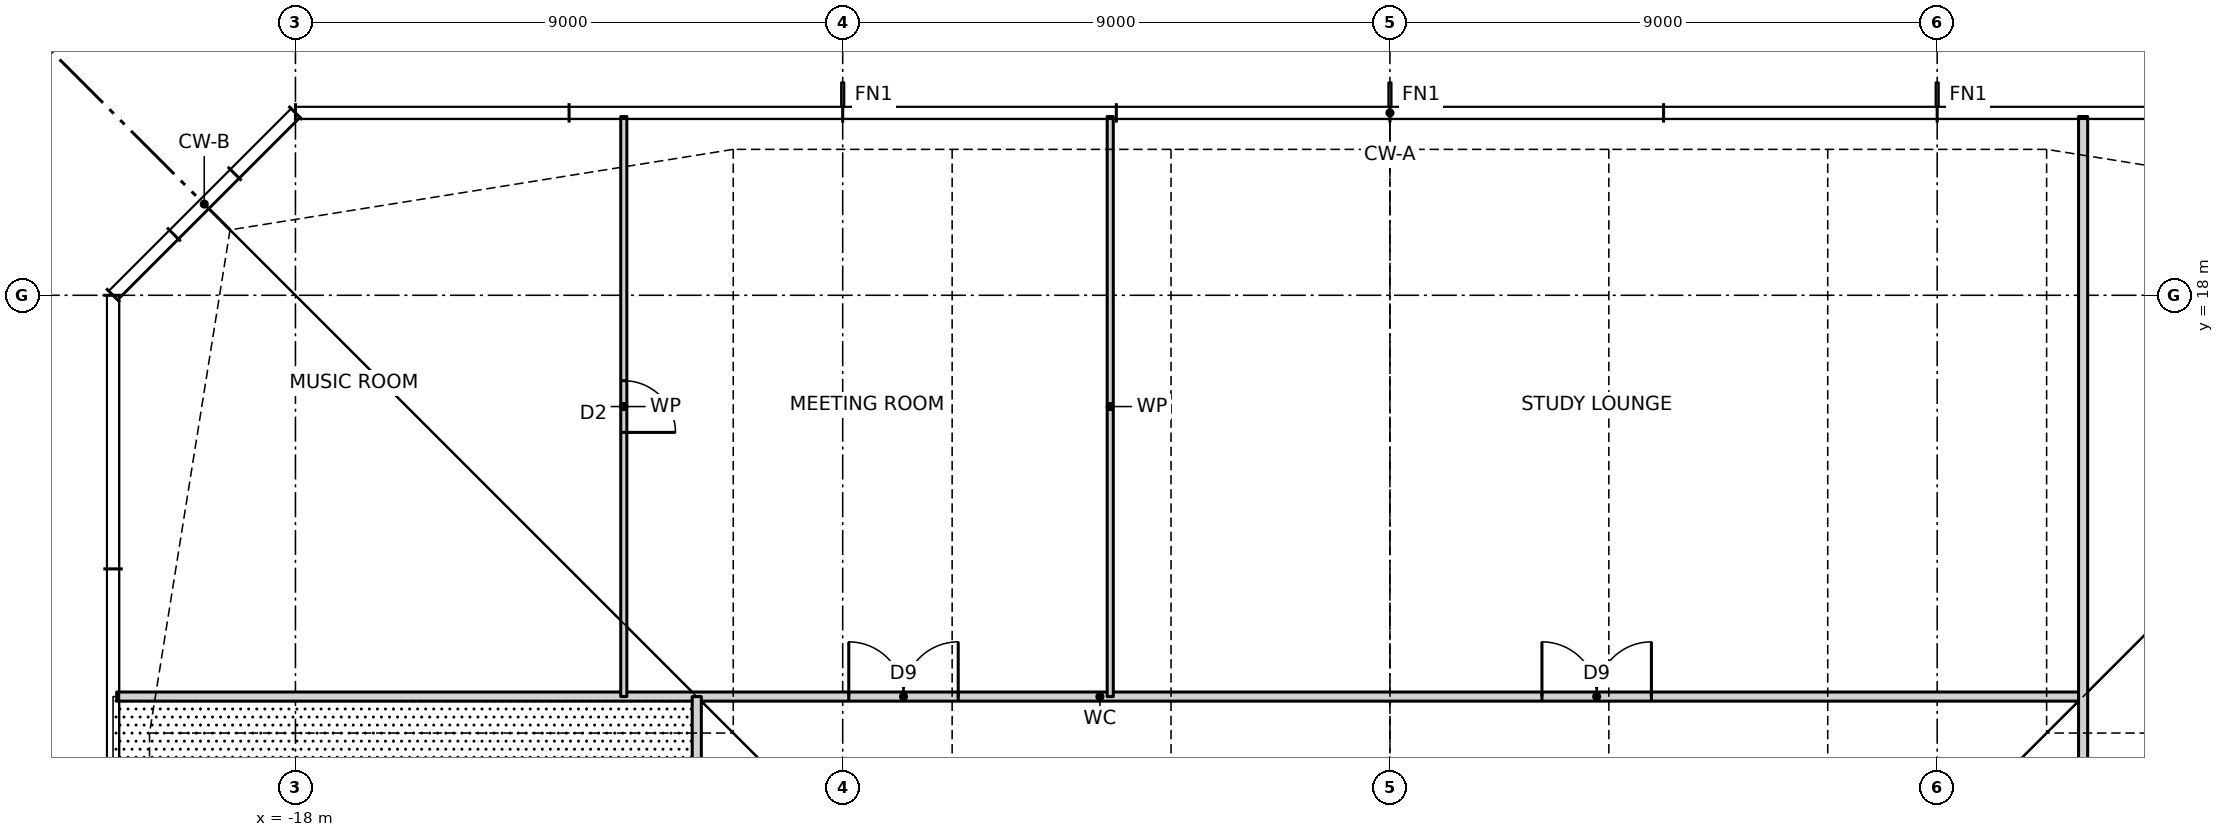
"""IFC4 building model, lengths in metres.
Left out: names, types, materials, properties, quantities, classifications, styles, units other than length and angle.
Written with IfcOpenShell. Run it as: python <this file> out.ifc"""

import sys

from ifc_helpers import new_model, si_unit, direction, frame, frame_2d, origin, place, context, subcontext, project, spatial, rectangle, extrude, element, fill, save


model = new_model("IFC4")
c1 = context("Model", 3, precision=1e-05, world=origin(), true_north=direction((0.0, 1.0)))
c2 = subcontext(c1, "Body", "Model", "MODEL_VIEW")
j1 = project(units=[si_unit("LENGTHUNIT", "METRE"), si_unit("PLANEANGLEUNIT", "RADIAN")], contexts=[c1])
p1 = place(None, origin())
s1 = spatial("IfcSite", under=j1, at=p1, CompositionType="ELEMENT")
p2 = place(p1, origin())
s2 = spatial("IfcBuilding", under=s1, at=p2, CompositionType="ELEMENT")
p3 = place(p2, frame((0.0, 0.0, 80.5)))
s3 = spatial("IfcBuildingStorey", under=s2, at=p3, CompositionType="ELEMENT", Elevation=80.5)
p4 = place(p3, frame((-20.94, 11.4, 0.0), z_axis=(0.0, 0.0, 1.0), x_axis=(1.0, 0.0, 0.0)))
e1 = element("IfcWall", 1, at=p4, inside=s3, PredefinedType="PARTITIONING", context=c2, shape_type="SweptSolid", body=[
    extrude(rectangle(XDim=32.34, YDim=0.15, at=frame_2d((16.17, 0.0))), origin(), (0.0, 0.0, 1.0), 3.27),
])
p5 = place(p4, frame((23.44, 0.0, 0.0)))
e2 = element("IfcOpeningElement", 2, at=p5, cuts=e1, PredefinedType="OPENING", context=c2, shape_type="SweptSolid", body=[
    extrude(rectangle(XDim=1.8, YDim=2.1, at=frame_2d((0.9, 1.05))), frame((0.0, 0.085, 0.0), z_axis=(0.0, -1.0, 0.0), x_axis=(1.0, 0.0, 0.0)), (0.0, 0.0, 1.0), 0.17),
])
p6 = place(p4, frame((12.04, 0.0, 0.0)))
e3 = element("IfcOpeningElement", 3, at=p6, cuts=e1, PredefinedType="OPENING", context=c2, shape_type="SweptSolid", body=[
    extrude(rectangle(XDim=1.8, YDim=2.1, at=frame_2d((0.9, 1.05))), frame((0.0, 0.085, 0.0), z_axis=(0.0, -1.0, 0.0), x_axis=(1.0, 0.0, 0.0)), (0.0, 0.0, 1.0), 0.17),
])
p7 = place(p3, frame((11.4, -11.4, 0.0), z_axis=(0.0, 0.0, 1.0), x_axis=(0.0, 1.0, 0.0)))
e4 = element("IfcWall", 4, at=p7, inside=s3, PredefinedType="PARTITIONING", context=c2, shape_type="SweptSolid", body=[
    extrude(rectangle(XDim=32.34, YDim=0.15, at=frame_2d((16.17, 0.0))), origin(), (0.0, 0.0, 1.0), 3.27),
])
p8 = place(p7, frame((1.65, 0.0, 0.0)))
e5 = element("IfcOpeningElement", 5, at=p8, cuts=e4, PredefinedType="OPENING", context=c2, shape_type="SweptSolid", body=[
    extrude(rectangle(XDim=0.9, YDim=2.1, at=frame_2d((0.45, 1.05))), frame((0.0, 0.085, 0.0), z_axis=(0.0, -1.0, 0.0), x_axis=(1.0, 0.0, 0.0)), (0.0, 0.0, 1.0), 0.17),
])
p9 = place(p7, frame((5.55, 0.0, 0.0)))
e6 = element("IfcOpeningElement", 6, at=p9, cuts=e4, PredefinedType="OPENING", context=c2, shape_type="SweptSolid", body=[
    extrude(rectangle(XDim=0.9, YDim=2.1, at=frame_2d((0.45, 1.05))), frame((0.0, 0.085, 0.0), z_axis=(0.0, -1.0, 0.0), x_axis=(1.0, 0.0, 0.0)), (0.0, 0.0, 1.0), 0.17),
])
p10 = place(p7, frame((8.55, 0.0, 0.0)))
e7 = element("IfcOpeningElement", 7, at=p10, cuts=e4, PredefinedType="OPENING", context=c2, shape_type="SweptSolid", body=[
    extrude(rectangle(XDim=0.9, YDim=2.1, at=frame_2d((0.45, 1.05))), frame((0.0, 0.085, 0.0), z_axis=(0.0, -1.0, 0.0), x_axis=(1.0, 0.0, 0.0)), (0.0, 0.0, 1.0), 0.17),
])
p11 = place(p7, frame((15.6, 0.0, 0.0)))
e8 = element("IfcOpeningElement", 8, at=p11, cuts=e4, PredefinedType="OPENING", context=c2, shape_type="SweptSolid", body=[
    extrude(rectangle(XDim=1.8, YDim=2.1, at=frame_2d((0.9, 1.05))), frame((0.0, 0.085, 0.0), z_axis=(0.0, -1.0, 0.0), x_axis=(1.0, 0.0, 0.0)), (0.0, 0.0, 1.0), 0.17),
])
p12 = place(p3, frame((-4.6, 11.4, 0.0), z_axis=(0.0, 0.0, 1.0), x_axis=(0.0, 1.0, 0.0)))
e9 = element("IfcWall", 9, at=p12, inside=s3, PredefinedType="PARTITIONING", context=c2, shape_type="SweptSolid", body=[
    extrude(rectangle(XDim=9.54, YDim=0.1, at=frame_2d((4.77, 0.0))), origin(), (0.0, 0.0, 1.0), 3.27),
])
p13 = place(p3, frame((-11.4, -20.94, 0.0), z_axis=(0.0, 0.0, 1.0), x_axis=(0.0, 1.0, 0.0)))
e10 = element("IfcWall", 10, at=p13, inside=s3, PredefinedType="PARTITIONING", context=c2, shape_type="SweptSolid", body=[
    extrude(rectangle(XDim=32.34, YDim=0.15, at=frame_2d((16.17, 0.0))), origin(), (0.0, 0.0, 1.0), 3.27),
])
p14 = place(p13, frame((21.44, 0.0, 0.0)))
e11 = element("IfcOpeningElement", 11, at=p14, cuts=e10, PredefinedType="OPENING", context=c2, shape_type="SweptSolid", body=[
    extrude(rectangle(XDim=1.8, YDim=2.1, at=frame_2d((0.9, 1.05))), frame((0.0, 0.085, 0.0), z_axis=(0.0, -1.0, 0.0), x_axis=(1.0, 0.0, 0.0)), (0.0, 0.0, 1.0), 0.17),
])
p15 = place(p13, frame((10.04, 0.0, 0.0)))
e12 = element("IfcOpeningElement", 12, at=p15, cuts=e10, PredefinedType="OPENING", context=c2, shape_type="SweptSolid", body=[
    extrude(rectangle(XDim=1.8, YDim=2.1, at=frame_2d((0.9, 1.05))), frame((0.0, 0.085, 0.0), z_axis=(0.0, -1.0, 0.0), x_axis=(1.0, 0.0, 0.0)), (0.0, 0.0, 1.0), 0.17),
])
p16 = place(p3, frame((-12.6, 11.4, 0.0), z_axis=(0.0, 0.0, 1.0), x_axis=(0.0, 1.0, 0.0)))
e13 = element("IfcWall", 13, at=p16, inside=s3, PredefinedType="PARTITIONING", context=c2, shape_type="SweptSolid", body=[
    extrude(rectangle(XDim=9.54, YDim=0.1, at=frame_2d((4.77, 0.0))), origin(), (0.0, 0.0, 1.0), 3.27),
])
p17 = place(p16, frame((4.345, 0.0, 0.0)))
e14 = element("IfcOpeningElement", 14, at=p17, cuts=e13, PredefinedType="OPENING", context=c2, shape_type="SweptSolid", body=[
    extrude(rectangle(XDim=0.85, YDim=2.1, at=frame_2d((0.425, 1.05))), frame((0.0, 0.06, 0.0), z_axis=(0.0, -1.0, 0.0), x_axis=(1.0, 0.0, 0.0)), (0.0, 0.0, 1.0), 0.12),
])
p18 = place(p5, origin())
e15 = element("IfcDoor", 15, at=p18, inside=s3, OperationType="DOUBLE_DOOR_SINGLE_SWING", PredefinedType="DOOR", context=c2, shape_type="SweptSolid", body=[
    extrude(rectangle(XDim=1.8, YDim=2.1, at=frame_2d((0.9, 1.05))), frame((0.0, 0.025, 0.0), z_axis=(0.0, -1.0, 0.0), x_axis=(1.0, 0.0, 0.0)), (0.0, 0.0, 1.0), 0.05),
])
fill(e2, e15)
p19 = place(p6, origin())
e16 = element("IfcDoor", 16, at=p19, inside=s3, OperationType="DOUBLE_DOOR_SINGLE_SWING", PredefinedType="DOOR", context=c2, shape_type="SweptSolid", body=[
    extrude(rectangle(XDim=1.8, YDim=2.1, at=frame_2d((0.9, 1.05))), frame((0.0, 0.025, 0.0), z_axis=(0.0, -1.0, 0.0), x_axis=(1.0, 0.0, 0.0)), (0.0, 0.0, 1.0), 0.05),
])
fill(e3, e16)
p20 = place(p17, frame((0.85, 0.0, 0.0), z_axis=(0.0, 0.0, 1.0), x_axis=(-1.0, 0.0, 0.0)))
e17 = element("IfcDoor", 17, at=p20, inside=s3, OperationType="SINGLE_SWING_RIGHT", PredefinedType="DOOR", context=c2, shape_type="SweptSolid", body=[
    extrude(rectangle(XDim=0.85, YDim=2.1, at=frame_2d((0.425, 1.05))), frame((0.0, 0.025, 0.0), z_axis=(0.0, -1.0, 0.0), x_axis=(1.0, 0.0, 0.0)), (0.0, 0.0, 1.0), 0.05),
])
fill(e14, e17)
save(model, sys.argv[1])
